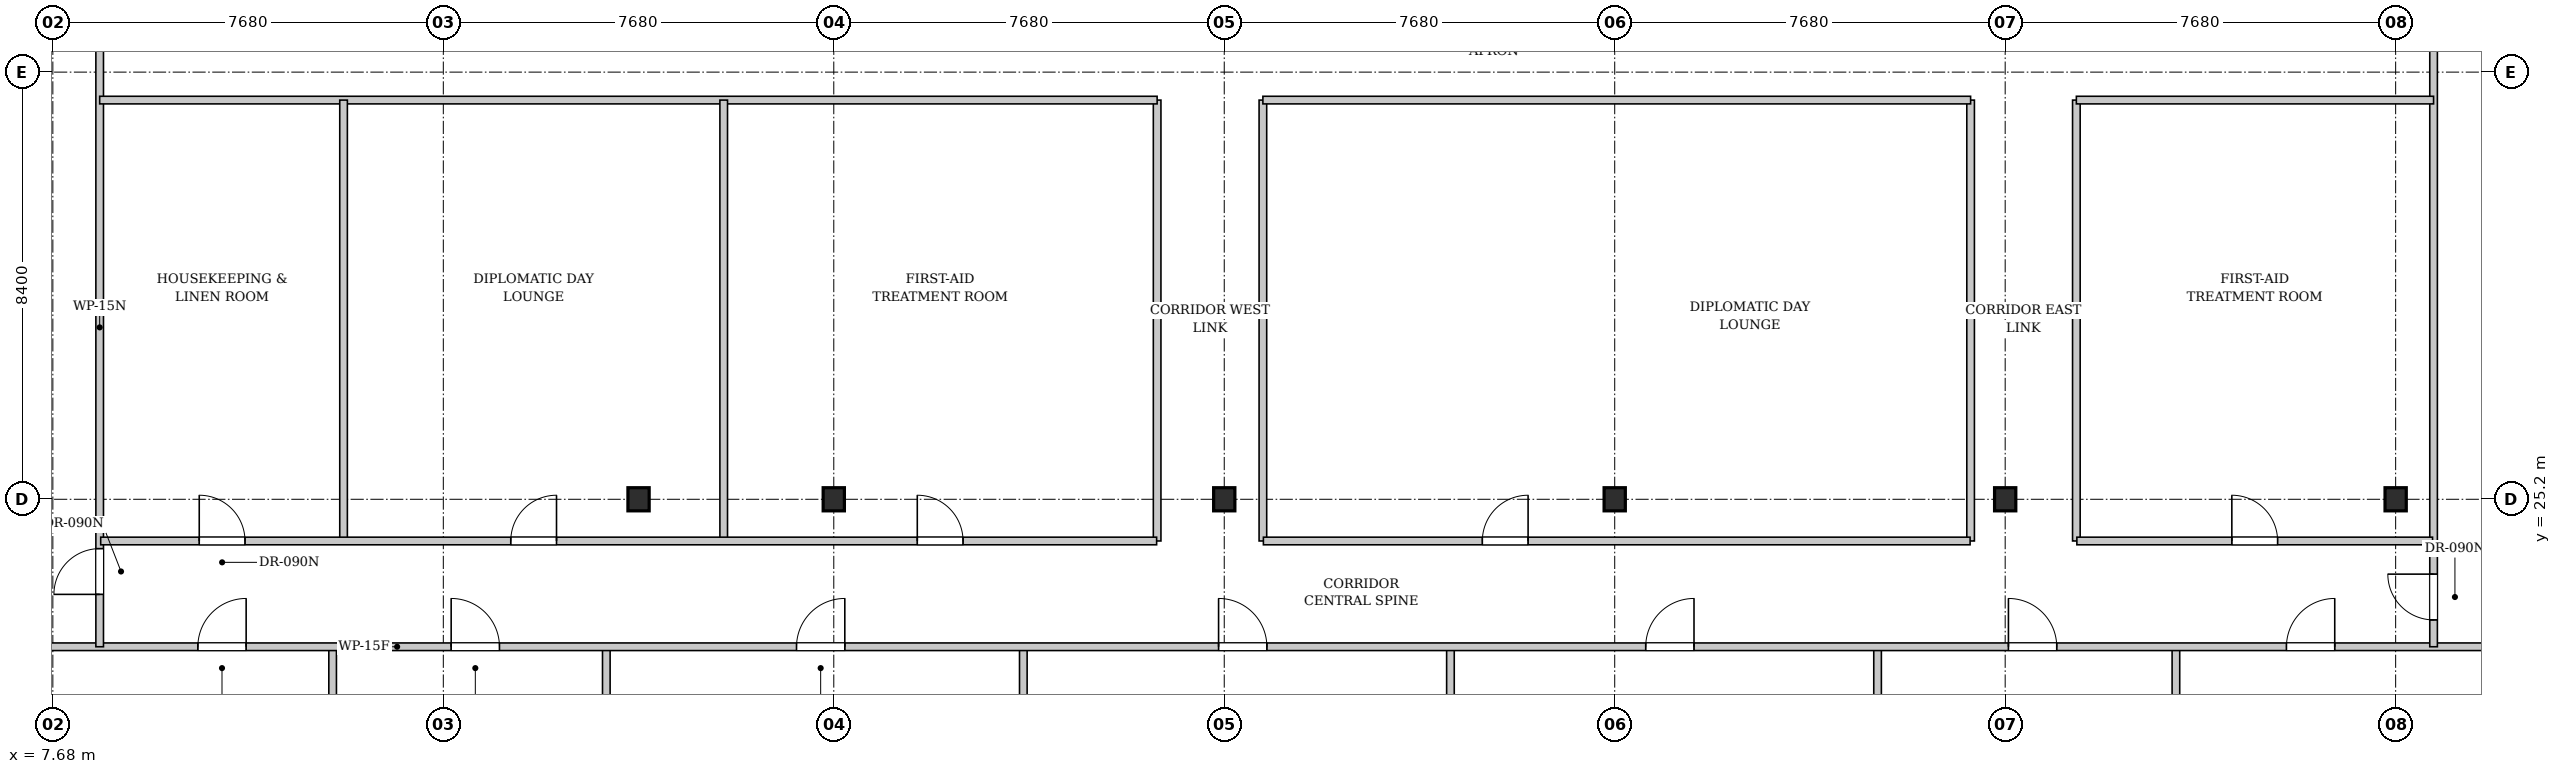
"""IFC4 building model, lengths in metres.
Left out: names, types, materials, properties, quantities, classifications, styles, units other than length and angle.
Written with IfcOpenShell. Run it as: python <this file> out.ifc"""

import sys

from ifc_helpers import new_model, si_unit, direction, frame, frame_2d, origin, origin_2d, place, context, subcontext, project, spatial, rectangle, i_section, extrude, element, fill, save


model = new_model("IFC4")
c1 = context("Model", 3, precision=1e-05, world=origin(), true_north=direction((0.0, 1.0)))
c2 = subcontext(c1, "Body", "Model", "MODEL_VIEW")
j1 = project(units=[si_unit("LENGTHUNIT", "METRE"), si_unit("PLANEANGLEUNIT", "RADIAN")], contexts=[c1])
p1 = place(None, origin())
s1 = spatial("IfcSite", under=j1, at=p1, CompositionType="ELEMENT")
p2 = place(p1, origin())
s2 = spatial("IfcBuilding", under=s1, at=p2, CompositionType="ELEMENT")
p3 = place(p2, frame((0.0, 0.0, 165.5)))
s3 = spatial("IfcBuildingStorey", under=s2, at=p3, CompositionType="ELEMENT", Elevation=165.5)
for number, where, z_axis, x_axis in (
    (1, (23.04, 25.2, 0.0), (0.0, 0.0, 1.0), (1.0, 0.0, 0.0)),
    (2, (30.72, 25.2, 0.0), (0.0, 0.0, 1.0), (1.0, 0.0, 0.0)),
    (3, (38.4, 25.2, 0.0), (0.0, 0.0, 1.0), (1.0, 0.0, 0.0)),
    (4, (46.08, 25.2, 0.0), (0.0, 0.0, 1.0), (1.0, 0.0, 0.0)),
    (5, (53.76, 25.2, 0.0), (0.0, 0.0, 1.0), (1.0, 0.0, 0.0)),
    (6, (19.2, 25.2, 0.0), (0.0, 0.0, 1.0), (1.0, 0.0, 0.0)),
):
    element("IfcColumn", number, at=place(p3, frame(where, z_axis=z_axis, x_axis=x_axis)), inside=s3, PredefinedType="COLUMN", context=c2, shape_type="SweptSolid", body=[
        extrude(i_section(OverallWidth=0.418, OverallDepth=0.455, WebThickness=0.042, FlangeThickness=0.068, FilletRadius=0.015, at=origin_2d()), origin(), (0.0, 0.0, 1.0), 3.3),
    ])
p4 = place(p3, frame((13.183, 12.893, 0.0), z_axis=(0.0, 0.0, 1.0), x_axis=(0.0, 1.0, 0.0)))
e7 = element("IfcWall", 7, at=p4, inside=s3, PredefinedType="PARTITIONING", context=c2, shape_type="SweptSolid", body=[
    extrude(rectangle(XDim=9.427, YDim=0.15, at=frame_2d((4.714, 0.0))), origin(), (0.0, 0.0, 1.0), 3.08),
])
p5 = place(p3, frame((18.566, 12.374, 0.0), z_axis=(0.0, 0.0, 1.0), x_axis=(0.0, 1.0, 0.0)))
e8 = element("IfcWall", 8, at=p5, inside=s3, PredefinedType="PARTITIONING", context=c2, shape_type="SweptSolid", body=[
    extrude(rectangle(XDim=9.946, YDim=0.15, at=frame_2d((4.973, 0.0))), origin(), (0.0, 0.0, 1.0), 2.475),
])
p6 = place(p3, frame((26.768, 11.585, 0.0), z_axis=(0.0, 0.0, 1.0), x_axis=(0.0, 1.0, 0.0)))
e9 = element("IfcWall", 9, at=p6, inside=s3, PredefinedType="PARTITIONING", context=c2, shape_type="SweptSolid", body=[
    extrude(rectangle(XDim=10.735, YDim=0.15, at=frame_2d((5.368, 0.0))), origin(), (0.0, 0.0, 1.0), 3.08),
])
p7 = place(p3, frame((35.169, 10.776, 0.0), z_axis=(0.0, 0.0, 1.0), x_axis=(0.0, 1.0, 0.0)))
e10 = element("IfcWall", 10, at=p7, inside=s3, PredefinedType="PARTITIONING", context=c2, shape_type="SweptSolid", body=[
    extrude(rectangle(XDim=11.544, YDim=0.15, at=frame_2d((5.772, 0.0))), origin(), (0.0, 0.0, 1.0), 3.08),
])
p8 = place(p3, frame((43.57, 9.967, 0.0), z_axis=(0.0, 0.0, 1.0), x_axis=(0.0, 1.0, 0.0)))
e11 = element("IfcWall", 11, at=p8, inside=s3, PredefinedType="PARTITIONING", context=c2, shape_type="SweptSolid", body=[
    extrude(rectangle(XDim=12.353, YDim=0.15, at=frame_2d((6.177, 0.0))), origin(), (0.0, 0.0, 1.0), 3.08),
])
p9 = place(p3, frame((49.438, 9.402, 0.0), z_axis=(0.0, 0.0, 1.0), x_axis=(0.0, 1.0, 0.0)))
e12 = element("IfcWall", 12, at=p9, inside=s3, PredefinedType="PARTITIONING", context=c2, shape_type="SweptSolid", body=[
    extrude(rectangle(XDim=12.918, YDim=0.15, at=frame_2d((6.459, 0.0))), origin(), (0.0, 0.0, 1.0), 3.08),
])
p10 = place(p3, frame((1.801, 22.3, 0.0), z_axis=(0.0, 0.0, 1.0), x_axis=(1.0, 0.0, 0.0)))
e13 = element("IfcWall", 13, at=p10, inside=s3, PredefinedType="PARTITIONING", context=c2, shape_type="SweptSolid", body=[
    extrude(rectangle(XDim=57.505, YDim=0.15, at=frame_2d((28.752, 0.0))), origin(), (0.0, 0.0, 1.0), 3.08),
])
p11 = place(p10, frame((8.731, 0.0, 0.0)))
e14 = element("IfcOpeningElement", 14, at=p11, cuts=e13, PredefinedType="OPENING", context=c2, shape_type="SweptSolid", body=[
    extrude(rectangle(XDim=0.95, YDim=2.15, at=frame_2d((0.475, 1.075))), frame((0.0, 0.085, 0.0), z_axis=(0.0, -1.0, 0.0), x_axis=(1.0, 0.0, 0.0)), (0.0, 0.0, 1.0), 0.17),
])
p12 = place(p10, frame((13.714, 0.0, 0.0)))
e15 = element("IfcOpeningElement", 15, at=p12, cuts=e13, PredefinedType="OPENING", context=c2, shape_type="SweptSolid", body=[
    extrude(rectangle(XDim=0.95, YDim=2.15, at=frame_2d((0.475, 1.075))), frame((0.0, 0.085, 0.0), z_axis=(0.0, -1.0, 0.0), x_axis=(1.0, 0.0, 0.0)), (0.0, 0.0, 1.0), 0.17),
])
p13 = place(p10, frame((20.506, 0.0, 0.0)))
e16 = element("IfcOpeningElement", 16, at=p13, cuts=e13, PredefinedType="OPENING", context=c2, shape_type="SweptSolid", body=[
    extrude(rectangle(XDim=0.95, YDim=2.15, at=frame_2d((0.475, 1.075))), frame((0.0, 0.085, 0.0), z_axis=(0.0, -1.0, 0.0), x_axis=(1.0, 0.0, 0.0)), (0.0, 0.0, 1.0), 0.17),
])
p14 = place(p10, frame((28.808, 0.0, 0.0)))
e17 = element("IfcOpeningElement", 17, at=p14, cuts=e13, PredefinedType="OPENING", context=c2, shape_type="SweptSolid", body=[
    extrude(rectangle(XDim=0.95, YDim=2.15, at=frame_2d((0.475, 1.075))), frame((0.0, 0.085, 0.0), z_axis=(0.0, -1.0, 0.0), x_axis=(1.0, 0.0, 0.0)), (0.0, 0.0, 1.0), 0.17),
])
p15 = place(p10, frame((37.209, 0.0, 0.0)))
e18 = element("IfcOpeningElement", 18, at=p15, cuts=e13, PredefinedType="OPENING", context=c2, shape_type="SweptSolid", body=[
    extrude(rectangle(XDim=0.95, YDim=2.15, at=frame_2d((0.475, 1.075))), frame((0.0, 0.085, 0.0), z_axis=(0.0, -1.0, 0.0), x_axis=(1.0, 0.0, 0.0)), (0.0, 0.0, 1.0), 0.17),
])
p16 = place(p10, frame((44.343, 0.0, 0.0)))
e19 = element("IfcOpeningElement", 19, at=p16, cuts=e13, PredefinedType="OPENING", context=c2, shape_type="SweptSolid", body=[
    extrude(rectangle(XDim=0.95, YDim=2.15, at=frame_2d((0.475, 1.075))), frame((0.0, 0.085, 0.0), z_axis=(0.0, -1.0, 0.0), x_axis=(1.0, 0.0, 0.0)), (0.0, 0.0, 1.0), 0.17),
])
p17 = place(p10, frame((49.811, 0.0, 0.0)))
e20 = element("IfcOpeningElement", 20, at=p17, cuts=e13, PredefinedType="OPENING", context=c2, shape_type="SweptSolid", body=[
    extrude(rectangle(XDim=0.95, YDim=2.15, at=frame_2d((0.475, 1.075))), frame((0.0, 0.085, 0.0), z_axis=(0.0, -1.0, 0.0), x_axis=(1.0, 0.0, 0.0)), (0.0, 0.0, 1.0), 0.17),
])
p18 = place(p3, frame((8.601, 22.3, 0.0), z_axis=(0.0, 0.0, 1.0), x_axis=(0.0, 1.0, 0.0)))
e21 = element("IfcWall", 21, at=p18, inside=s3, PredefinedType="PARTITIONING", context=c2, shape_type="SweptSolid", body=[
    extrude(rectangle(XDim=28.547, YDim=0.15, at=frame_2d((14.273, 0.0))), origin(), (0.0, 0.0, 1.0), 3.08),
])
p19 = place(p18, frame((1.03, 0.0, 0.0)))
e22 = element("IfcOpeningElement", 22, at=p19, cuts=e21, PredefinedType="OPENING", context=c2, shape_type="SweptSolid", body=[
    extrude(rectangle(XDim=0.9, YDim=2.15, at=frame_2d((0.45, 1.075))), frame((0.0, 0.085, 0.0), z_axis=(0.0, -1.0, 0.0), x_axis=(1.0, 0.0, 0.0)), (0.0, 0.0, 1.0), 0.17),
])
p20 = place(p3, frame((54.506, 22.3, 0.0), z_axis=(0.0, 0.0, 1.0), x_axis=(0.0, 1.0, 0.0)))
e23 = element("IfcWall", 23, at=p20, inside=s3, PredefinedType="PARTITIONING", context=c2, shape_type="SweptSolid", body=[
    extrude(rectangle(XDim=24.126, YDim=0.15, at=frame_2d((12.063, 0.0))), origin(), (0.0, 0.0, 1.0), 3.08),
])
p21 = place(p20, frame((0.528, 0.0, 0.0)))
e24 = element("IfcOpeningElement", 24, at=p21, cuts=e23, PredefinedType="OPENING", context=c2, shape_type="SweptSolid", body=[
    extrude(rectangle(XDim=0.9, YDim=2.15, at=frame_2d((0.45, 1.075))), frame((0.0, 0.085, 0.0), z_axis=(0.0, -1.0, 0.0), x_axis=(1.0, 0.0, 0.0)), (0.0, 0.0, 1.0), 0.17),
])
for number, where, z_axis, x_axis in (
    (25, (29.4, 24.38, 0.0), (0.0, 0.0, 1.0), (0.0, 1.0, 0.0)),
    (26, (31.48, 24.38, 0.0), (0.0, 0.0, 1.0), (0.0, 1.0, 0.0)),
    (27, (45.4, 24.38, 0.0), (0.0, 0.0, 1.0), (0.0, 1.0, 0.0)),
    (28, (47.48, 24.38, 0.0), (0.0, 0.0, 1.0), (0.0, 1.0, 0.0)),
):
    element("IfcWall", number, at=place(p3, frame(where, z_axis=z_axis, x_axis=x_axis)), inside=s3, PredefinedType="PARTITIONING", context=c2, shape_type="SweptSolid", body=[
        extrude(rectangle(XDim=8.67, YDim=0.15, at=frame_2d((4.335, 0.0))), origin(), (0.0, 0.0, 1.0), 3.08),
    ])
p22 = place(p3, frame((8.601, 33.05, 0.0), z_axis=(0.0, 0.0, 1.0), x_axis=(1.0, 0.0, 0.0)))
e29 = element("IfcWall", 29, at=p22, inside=s3, PredefinedType="PARTITIONING", context=c2, shape_type="SweptSolid", body=[
    extrude(rectangle(XDim=20.799, YDim=0.15, at=frame_2d((10.399, 0.0))), origin(), (0.0, 0.0, 1.0), 2.475),
])
p23 = place(p3, frame((31.48, 33.05, 0.0), z_axis=(0.0, 0.0, 1.0), x_axis=(1.0, 0.0, 0.0)))
e30 = element("IfcWall", 30, at=p23, inside=s3, PredefinedType="PARTITIONING", context=c2, shape_type="SweptSolid", body=[
    extrude(rectangle(XDim=13.92, YDim=0.15, at=frame_2d((6.96, 0.0))), origin(), (0.0, 0.0, 1.0), 3.08),
])
p24 = place(p3, frame((47.48, 33.05, 0.0), z_axis=(0.0, 0.0, 1.0), x_axis=(1.0, 0.0, 0.0)))
e31 = element("IfcWall", 31, at=p24, inside=s3, PredefinedType="PARTITIONING", context=c2, shape_type="SweptSolid", body=[
    extrude(rectangle(XDim=7.026, YDim=0.15, at=frame_2d((3.513, 0.0))), origin(), (0.0, 0.0, 1.0), 3.08),
])
for number, where, z_axis, x_axis in (
    (32, (13.398, 24.38, 0.0), (0.0, 0.0, 1.0), (0.0, 1.0, 0.0)),
    (33, (20.875, 24.38, 0.0), (0.0, 0.0, 1.0), (0.0, 1.0, 0.0)),
):
    element("IfcWall", number, at=place(p3, frame(where, z_axis=z_axis, x_axis=x_axis)), inside=s3, PredefinedType="PARTITIONING", context=c2, shape_type="SweptSolid", body=[
        extrude(rectangle(XDim=8.67, YDim=0.15, at=frame_2d((4.335, 0.0))), origin(), (0.0, 0.0, 1.0), 3.08),
    ])
p25 = place(p3, frame((8.621, 24.38, 0.0), z_axis=(0.0, 0.0, 1.0), x_axis=(1.0, 0.0, 0.0)))
e34 = element("IfcWall", 34, at=p25, inside=s3, PredefinedType="PARTITIONING", context=c2, shape_type="SweptSolid", body=[
    extrude(rectangle(XDim=20.769, YDim=0.15, at=frame_2d((10.384, 0.0))), origin(), (0.0, 0.0, 1.0), 3.08),
])
p26 = place(p25, frame((1.938, 0.0, 0.0)))
e35 = element("IfcOpeningElement", 35, at=p26, cuts=e34, PredefinedType="OPENING", context=c2, shape_type="SweptSolid", body=[
    extrude(rectangle(XDim=0.9, YDim=2.15, at=frame_2d((0.45, 1.075))), frame((0.0, 0.085, 0.0), z_axis=(0.0, -1.0, 0.0), x_axis=(1.0, 0.0, 0.0)), (0.0, 0.0, 1.0), 0.17),
])
p27 = place(p25, frame((8.065, 0.0, 0.0)))
e36 = element("IfcOpeningElement", 36, at=p27, cuts=e34, PredefinedType="OPENING", context=c2, shape_type="SweptSolid", body=[
    extrude(rectangle(XDim=0.9, YDim=2.15, at=frame_2d((0.45, 1.075))), frame((0.0, 0.085, 0.0), z_axis=(0.0, -1.0, 0.0), x_axis=(1.0, 0.0, 0.0)), (0.0, 0.0, 1.0), 0.17),
])
p28 = place(p25, frame((16.062, 0.0, 0.0)))
e37 = element("IfcOpeningElement", 37, at=p28, cuts=e34, PredefinedType="OPENING", context=c2, shape_type="SweptSolid", body=[
    extrude(rectangle(XDim=0.9, YDim=2.15, at=frame_2d((0.45, 1.075))), frame((0.0, 0.085, 0.0), z_axis=(0.0, -1.0, 0.0), x_axis=(1.0, 0.0, 0.0)), (0.0, 0.0, 1.0), 0.17),
])
p29 = place(p3, frame((31.49, 24.38, 0.0), z_axis=(0.0, 0.0, 1.0), x_axis=(1.0, 0.0, 0.0)))
e38 = element("IfcWall", 38, at=p29, inside=s3, PredefinedType="PARTITIONING", context=c2, shape_type="SweptSolid", body=[
    extrude(rectangle(XDim=13.9, YDim=0.15, at=frame_2d((6.95, 0.0))), origin(), (0.0, 0.0, 1.0), 3.08),
])
p30 = place(p29, frame((4.306, 0.0, 0.0)))
e39 = element("IfcOpeningElement", 39, at=p30, cuts=e38, PredefinedType="OPENING", context=c2, shape_type="SweptSolid", body=[
    extrude(rectangle(XDim=0.9, YDim=2.15, at=frame_2d((0.45, 1.075))), frame((0.0, 0.085, 0.0), z_axis=(0.0, -1.0, 0.0), x_axis=(1.0, 0.0, 0.0)), (0.0, 0.0, 1.0), 0.17),
])
p31 = place(p3, frame((47.49, 24.38, 0.0), z_axis=(0.0, 0.0, 1.0), x_axis=(1.0, 0.0, 0.0)))
e40 = element("IfcWall", 40, at=p31, inside=s3, PredefinedType="PARTITIONING", context=c2, shape_type="SweptSolid", body=[
    extrude(rectangle(XDim=6.996, YDim=0.15, at=frame_2d((3.498, 0.0))), origin(), (0.0, 0.0, 1.0), 3.08),
])
p32 = place(p31, frame((3.048, 0.0, 0.0)))
e41 = element("IfcOpeningElement", 41, at=p32, cuts=e40, PredefinedType="OPENING", context=c2, shape_type="SweptSolid", body=[
    extrude(rectangle(XDim=0.9, YDim=2.15, at=frame_2d((0.45, 1.075))), frame((0.0, 0.085, 0.0), z_axis=(0.0, -1.0, 0.0), x_axis=(1.0, 0.0, 0.0)), (0.0, 0.0, 1.0), 0.17),
])
p33 = place(p11, origin())
e42 = element("IfcDoor", 42, at=p33, inside=s3, OperationType="SINGLE_SWING_RIGHT", PredefinedType="DOOR", context=c2, shape_type="SweptSolid", body=[
    extrude(rectangle(XDim=0.95, YDim=2.15, at=frame_2d((0.475, 1.075))), frame((0.0, 0.025, 0.0), z_axis=(0.0, -1.0, 0.0), x_axis=(1.0, 0.0, 0.0)), (0.0, 0.0, 1.0), 0.05),
])
fill(e14, e42)
p34 = place(p12, origin())
e43 = element("IfcDoor", 43, at=p34, inside=s3, OperationType="SINGLE_SWING_LEFT", PredefinedType="DOOR", context=c2, shape_type="SweptSolid", body=[
    extrude(rectangle(XDim=0.95, YDim=2.15, at=frame_2d((0.475, 1.075))), frame((0.0, 0.025, 0.0), z_axis=(0.0, -1.0, 0.0), x_axis=(1.0, 0.0, 0.0)), (0.0, 0.0, 1.0), 0.05),
])
fill(e15, e43)
p35 = place(p13, origin())
e44 = element("IfcDoor", 44, at=p35, inside=s3, OperationType="SINGLE_SWING_RIGHT", PredefinedType="DOOR", context=c2, shape_type="SweptSolid", body=[
    extrude(rectangle(XDim=0.95, YDim=2.15, at=frame_2d((0.475, 1.075))), frame((0.0, 0.025, 0.0), z_axis=(0.0, -1.0, 0.0), x_axis=(1.0, 0.0, 0.0)), (0.0, 0.0, 1.0), 0.05),
])
fill(e16, e44)
p36 = place(p14, origin())
e45 = element("IfcDoor", 45, at=p36, inside=s3, OperationType="SINGLE_SWING_LEFT", PredefinedType="DOOR", context=c2, shape_type="SweptSolid", body=[
    extrude(rectangle(XDim=0.95, YDim=2.15, at=frame_2d((0.475, 1.075))), frame((0.0, 0.025, 0.0), z_axis=(0.0, -1.0, 0.0), x_axis=(1.0, 0.0, 0.0)), (0.0, 0.0, 1.0), 0.05),
])
fill(e17, e45)
p37 = place(p15, origin())
e46 = element("IfcDoor", 46, at=p37, inside=s3, OperationType="SINGLE_SWING_RIGHT", PredefinedType="DOOR", context=c2, shape_type="SweptSolid", body=[
    extrude(rectangle(XDim=0.95, YDim=2.15, at=frame_2d((0.475, 1.075))), frame((0.0, 0.025, 0.0), z_axis=(0.0, -1.0, 0.0), x_axis=(1.0, 0.0, 0.0)), (0.0, 0.0, 1.0), 0.05),
])
fill(e18, e46)
p38 = place(p16, origin())
e47 = element("IfcDoor", 47, at=p38, inside=s3, OperationType="SINGLE_SWING_LEFT", PredefinedType="DOOR", context=c2, shape_type="SweptSolid", body=[
    extrude(rectangle(XDim=0.95, YDim=2.15, at=frame_2d((0.475, 1.075))), frame((0.0, 0.025, 0.0), z_axis=(0.0, -1.0, 0.0), x_axis=(1.0, 0.0, 0.0)), (0.0, 0.0, 1.0), 0.05),
])
fill(e19, e47)
p39 = place(p17, origin())
e48 = element("IfcDoor", 48, at=p39, inside=s3, OperationType="SINGLE_SWING_RIGHT", PredefinedType="DOOR", context=c2, shape_type="SweptSolid", body=[
    extrude(rectangle(XDim=0.95, YDim=2.15, at=frame_2d((0.475, 1.075))), frame((0.0, 0.025, 0.0), z_axis=(0.0, -1.0, 0.0), x_axis=(1.0, 0.0, 0.0)), (0.0, 0.0, 1.0), 0.05),
])
fill(e20, e48)
p40 = place(p19, origin())
e49 = element("IfcDoor", 49, at=p40, inside=s3, OperationType="SINGLE_SWING_LEFT", PredefinedType="DOOR", context=c2, shape_type="SweptSolid", body=[
    extrude(rectangle(XDim=0.9, YDim=2.15, at=frame_2d((0.45, 1.075))), frame((0.0, 0.025, 0.0), z_axis=(0.0, -1.0, 0.0), x_axis=(1.0, 0.0, 0.0)), (0.0, 0.0, 1.0), 0.05),
])
fill(e22, e49)
p41 = place(p21, origin())
e50 = element("IfcDoor", 50, at=p41, inside=s3, OperationType="SINGLE_SWING_RIGHT", PredefinedType="DOOR", context=c2, shape_type="SweptSolid", body=[
    extrude(rectangle(XDim=0.9, YDim=2.15, at=frame_2d((0.45, 1.075))), frame((0.0, 0.025, 0.0), z_axis=(0.0, -1.0, 0.0), x_axis=(1.0, 0.0, 0.0)), (0.0, 0.0, 1.0), 0.05),
])
fill(e24, e50)
p42 = place(p26, origin())
e51 = element("IfcDoor", 51, at=p42, inside=s3, OperationType="SINGLE_SWING_LEFT", PredefinedType="DOOR", context=c2, shape_type="SweptSolid", body=[
    extrude(rectangle(XDim=0.9, YDim=2.15, at=frame_2d((0.45, 1.075))), frame((0.0, 0.025, 0.0), z_axis=(0.0, -1.0, 0.0), x_axis=(1.0, 0.0, 0.0)), (0.0, 0.0, 1.0), 0.05),
])
fill(e35, e51)
p43 = place(p27, origin())
e52 = element("IfcDoor", 52, at=p43, inside=s3, OperationType="SINGLE_SWING_RIGHT", PredefinedType="DOOR", context=c2, shape_type="SweptSolid", body=[
    extrude(rectangle(XDim=0.9, YDim=2.15, at=frame_2d((0.45, 1.075))), frame((0.0, 0.025, 0.0), z_axis=(0.0, -1.0, 0.0), x_axis=(1.0, 0.0, 0.0)), (0.0, 0.0, 1.0), 0.05),
])
fill(e36, e52)
p44 = place(p28, origin())
e53 = element("IfcDoor", 53, at=p44, inside=s3, OperationType="SINGLE_SWING_LEFT", PredefinedType="DOOR", context=c2, shape_type="SweptSolid", body=[
    extrude(rectangle(XDim=0.9, YDim=2.15, at=frame_2d((0.45, 1.075))), frame((0.0, 0.025, 0.0), z_axis=(0.0, -1.0, 0.0), x_axis=(1.0, 0.0, 0.0)), (0.0, 0.0, 1.0), 0.05),
])
fill(e37, e53)
p45 = place(p30, origin())
e54 = element("IfcDoor", 54, at=p45, inside=s3, OperationType="SINGLE_SWING_RIGHT", PredefinedType="DOOR", context=c2, shape_type="SweptSolid", body=[
    extrude(rectangle(XDim=0.9, YDim=2.15, at=frame_2d((0.45, 1.075))), frame((0.0, 0.025, 0.0), z_axis=(0.0, -1.0, 0.0), x_axis=(1.0, 0.0, 0.0)), (0.0, 0.0, 1.0), 0.05),
])
fill(e39, e54)
p46 = place(p32, origin())
e55 = element("IfcDoor", 55, at=p46, inside=s3, OperationType="SINGLE_SWING_LEFT", PredefinedType="DOOR", context=c2, shape_type="SweptSolid", body=[
    extrude(rectangle(XDim=0.9, YDim=2.15, at=frame_2d((0.45, 1.075))), frame((0.0, 0.025, 0.0), z_axis=(0.0, -1.0, 0.0), x_axis=(1.0, 0.0, 0.0)), (0.0, 0.0, 1.0), 0.05),
])
fill(e41, e55)
save(model, sys.argv[1])
